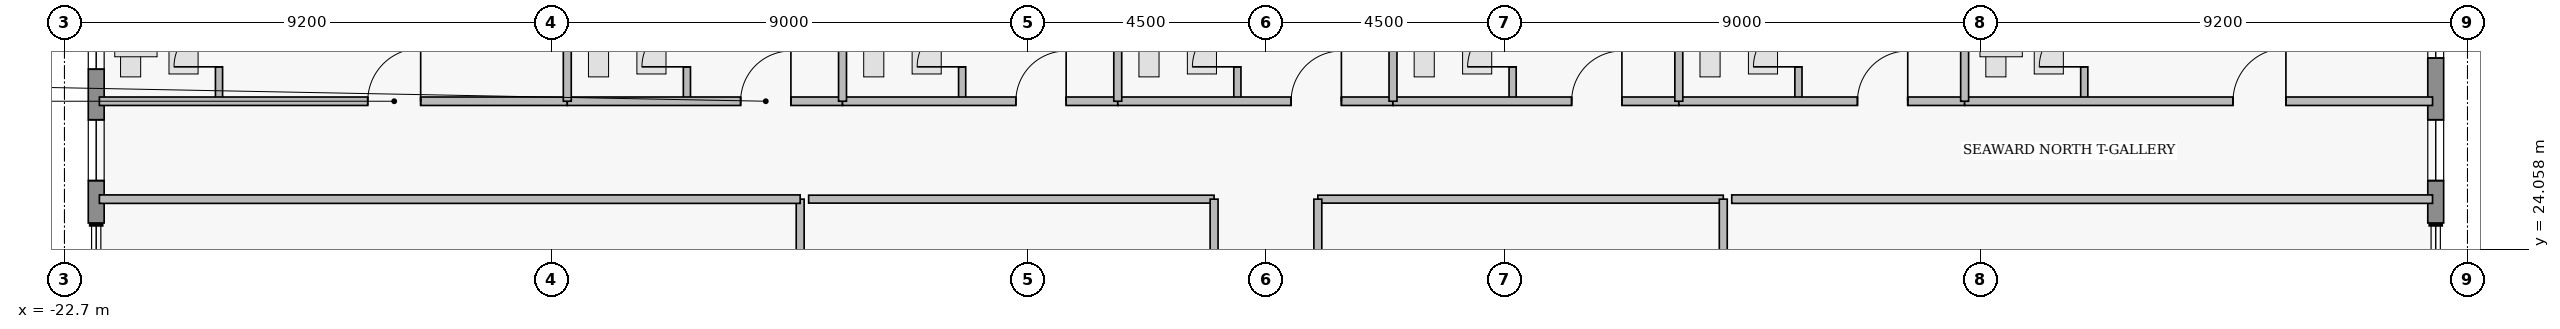
"""IFC4 building model, lengths in metres.
Left out: names, types, materials, properties, quantities, classifications, styles, units other than length and angle.
Written with IfcOpenShell. Run it as: python <this file> out.ifc"""

import sys

from ifc_helpers import new_model, si_unit, direction, frame, frame_2d, origin, place, context, subcontext, project, spatial, rectangle, extrude, element, fill, save


model = new_model("IFC4")
c1 = context("Model", 3, precision=1e-05, world=origin(), true_north=direction((0.0, 1.0)))
c2 = subcontext(c1, "Body", "Model", "MODEL_VIEW")
j1 = project(units=[si_unit("LENGTHUNIT", "METRE"), si_unit("PLANEANGLEUNIT", "RADIAN")], contexts=[c1])
p1 = place(None, origin())
s1 = spatial("IfcSite", under=j1, at=p1, CompositionType="ELEMENT")
p2 = place(p1, origin())
s2 = spatial("IfcBuilding", under=s1, at=p2, CompositionType="ELEMENT")
p3 = place(p2, frame((0.0, 0.0, 199.9)))
s3 = spatial("IfcBuildingStorey", under=s2, at=p3, CompositionType="ELEMENT", Elevation=199.9)
p4 = place(p3, frame((-22.1, 24.55, 0.0), z_axis=(0.0, 0.0, 1.0), x_axis=(0.0, 1.0, 0.0)))
e1 = element("IfcWall", 1, at=p4, inside=s3, PredefinedType="STANDARD", context=c2, shape_type="SweptSolid", body=[
    extrude(rectangle(XDim=5.65, YDim=0.3, at=frame_2d((2.825, 0.0))), origin(), (0.0, 0.0, 1.0), 3.53),
])
p5 = place(p4, frame((0.8, 0.0, 0.95)))
e2 = element("IfcOpeningElement", 2, at=p5, cuts=e1, PredefinedType="OPENING", context=c2, shape_type="SweptSolid", body=[
    extrude(rectangle(XDim=1.15, YDim=1.55, at=frame_2d((0.575, 0.775))), frame((0.0, 0.16, 0.0), z_axis=(0.0, -1.0, 0.0), x_axis=(1.0, 0.0, 0.0)), (0.0, 0.0, 1.0), 0.32),
])
p6 = place(p4, frame((2.905, 0.0, 0.95)))
e3 = element("IfcOpeningElement", 3, at=p6, cuts=e1, PredefinedType="OPENING", context=c2, shape_type="SweptSolid", body=[
    extrude(rectangle(XDim=1.15, YDim=1.55, at=frame_2d((0.575, 0.775))), frame((0.0, 0.16, 0.0), z_axis=(0.0, -1.0, 0.0), x_axis=(1.0, 0.0, 0.0)), (0.0, 0.0, 1.0), 0.32),
])
p7 = place(p3, frame((22.1, 30.2, 0.0), z_axis=(0.0, 0.0, 1.0), x_axis=(0.0, -1.0, 0.0)))
e4 = element("IfcWall", 4, at=p7, inside=s3, PredefinedType="STANDARD", context=c2, shape_type="SweptSolid", body=[
    extrude(rectangle(XDim=5.65, YDim=0.3, at=frame_2d((2.825, 0.0))), origin(), (0.0, 0.0, 1.0), 3.53),
])
p8 = place(p7, frame((0.935, 0.0, 0.85)))
e5 = element("IfcOpeningElement", 5, at=p8, cuts=e4, PredefinedType="OPENING", context=c2, shape_type="SweptSolid", body=[
    extrude(rectangle(XDim=1.6, YDim=1.8, at=frame_2d((0.8, 0.9))), frame((0.0, 0.16, 0.0), z_axis=(0.0, -1.0, 0.0), x_axis=(1.0, 0.0, 0.0)), (0.0, 0.0, 1.0), 0.32),
])
p9 = place(p7, frame((3.7, 0.0, 0.95)))
e6 = element("IfcOpeningElement", 6, at=p9, cuts=e4, PredefinedType="OPENING", context=c2, shape_type="SweptSolid", body=[
    extrude(rectangle(XDim=1.15, YDim=1.55, at=frame_2d((0.575, 0.775))), frame((0.0, 0.16, 0.0), z_axis=(0.0, -1.0, 0.0), x_axis=(1.0, 0.0, 0.0)), (0.0, 0.0, 1.0), 0.32),
])
p10 = place(p3, frame((-19.78, 26.85, 0.0), z_axis=(0.0, 0.0, 1.0), x_axis=(0.0, 1.0, 0.0)))
e7 = element("IfcWall", 7, at=p10, inside=s3, PredefinedType="PLUMBINGWALL", context=c2, shape_type="SweptSolid", body=[
    extrude(rectangle(XDim=2.36, YDim=0.135, at=frame_2d((1.18, 0.0))), origin(), (0.0, 0.0, 1.0), 3.53),
])
p11 = place(p10, frame((0.65, 0.0, 0.0)))
e8 = element("IfcOpeningElement", 8, at=p11, cuts=e7, PredefinedType="OPENING", context=c2, shape_type="SweptSolid", body=[
    extrude(rectangle(XDim=0.85, YDim=2.1, at=frame_2d((0.425, 1.05))), frame((0.0, 0.077, 0.0), z_axis=(0.0, -1.0, 0.0), x_axis=(1.0, 0.0, 0.0)), (0.0, 0.0, 1.0), 0.155),
])
p12 = place(p3, frame((-22.04, 26.85, 0.0), z_axis=(0.0, 0.0, 1.0), x_axis=(1.0, 0.0, 0.0)))
e9 = element("IfcWall", 9, at=p12, inside=s3, PredefinedType="PARTITIONING", context=c2, shape_type="SweptSolid", body=[
    extrude(rectangle(XDim=8.84, YDim=0.16, at=frame_2d((4.42, 0.0))), origin(), (0.0, 0.0, 1.0), 3.53),
])
p13 = place(p12, frame((5.07, 0.0, 0.0)))
e10 = element("IfcOpeningElement", 10, at=p13, cuts=e9, PredefinedType="OPENING", context=c2, shape_type="SweptSolid", body=[
    extrude(rectangle(XDim=1.0, YDim=2.15, at=frame_2d((0.5, 1.075))), frame((0.0, 0.09, 0.0), z_axis=(0.0, -1.0, 0.0), x_axis=(1.0, 0.0, 0.0)), (0.0, 0.0, 1.0), 0.18),
])
p14 = place(p3, frame((-10.94, 26.85, 0.0), z_axis=(0.0, 0.0, 1.0), x_axis=(0.0, 1.0, 0.0)))
e11 = element("IfcWall", 11, at=p14, inside=s3, PredefinedType="PLUMBINGWALL", context=c2, shape_type="SweptSolid", body=[
    extrude(rectangle(XDim=2.36, YDim=0.135, at=frame_2d((1.18, 0.0))), origin(), (0.0, 0.0, 1.0), 3.53),
])
p15 = place(p14, frame((0.65, 0.0, 0.0)))
e12 = element("IfcOpeningElement", 12, at=p15, cuts=e11, PredefinedType="OPENING", context=c2, shape_type="SweptSolid", body=[
    extrude(rectangle(XDim=0.85, YDim=2.1, at=frame_2d((0.425, 1.05))), frame((0.0, 0.077, 0.0), z_axis=(0.0, -1.0, 0.0), x_axis=(1.0, 0.0, 0.0)), (0.0, 0.0, 1.0), 0.155),
])
p16 = place(p3, frame((-13.2, 26.85, 0.0), z_axis=(0.0, 0.0, 1.0), x_axis=(1.0, 0.0, 0.0)))
e13 = element("IfcWall", 13, at=p16, inside=s3, PredefinedType="PARTITIONING", context=c2, shape_type="SweptSolid", body=[
    extrude(rectangle(XDim=5.2, YDim=0.16, at=frame_2d((2.6, 0.0))), origin(), (0.0, 0.0, 1.0), 3.53),
])
p17 = place(p16, frame((3.275, 0.0, 0.0)))
e14 = element("IfcOpeningElement", 14, at=p17, cuts=e13, PredefinedType="OPENING", context=c2, shape_type="SweptSolid", body=[
    extrude(rectangle(XDim=0.95, YDim=2.15, at=frame_2d((0.475, 1.075))), frame((0.0, 0.09, 0.0), z_axis=(0.0, -1.0, 0.0), x_axis=(1.0, 0.0, 0.0)), (0.0, 0.0, 1.0), 0.18),
])
p18 = place(p3, frame((-5.74, 26.85, 0.0), z_axis=(0.0, 0.0, 1.0), x_axis=(0.0, 1.0, 0.0)))
e15 = element("IfcWall", 15, at=p18, inside=s3, PredefinedType="PLUMBINGWALL", context=c2, shape_type="SweptSolid", body=[
    extrude(rectangle(XDim=2.36, YDim=0.135, at=frame_2d((1.18, 0.0))), origin(), (0.0, 0.0, 1.0), 3.53),
])
p19 = place(p18, frame((0.65, 0.0, 0.0)))
e16 = element("IfcOpeningElement", 16, at=p19, cuts=e15, PredefinedType="OPENING", context=c2, shape_type="SweptSolid", body=[
    extrude(rectangle(XDim=0.85, YDim=2.1, at=frame_2d((0.425, 1.05))), frame((0.0, 0.077, 0.0), z_axis=(0.0, -1.0, 0.0), x_axis=(1.0, 0.0, 0.0)), (0.0, 0.0, 1.0), 0.155),
])
p20 = place(p3, frame((-8.0, 26.85, 0.0), z_axis=(0.0, 0.0, 1.0), x_axis=(1.0, 0.0, 0.0)))
e17 = element("IfcWall", 17, at=p20, inside=s3, PredefinedType="PARTITIONING", context=c2, shape_type="SweptSolid", body=[
    extrude(rectangle(XDim=5.2, YDim=0.16, at=frame_2d((2.6, 0.0))), origin(), (0.0, 0.0, 1.0), 3.53),
])
p21 = place(p20, frame((3.275, 0.0, 0.0)))
e18 = element("IfcOpeningElement", 18, at=p21, cuts=e17, PredefinedType="OPENING", context=c2, shape_type="SweptSolid", body=[
    extrude(rectangle(XDim=0.95, YDim=2.15, at=frame_2d((0.475, 1.075))), frame((0.0, 0.09, 0.0), z_axis=(0.0, -1.0, 0.0), x_axis=(1.0, 0.0, 0.0)), (0.0, 0.0, 1.0), 0.18),
])
p22 = place(p3, frame((-0.54, 26.85, 0.0), z_axis=(0.0, 0.0, 1.0), x_axis=(0.0, 1.0, 0.0)))
e19 = element("IfcWall", 19, at=p22, inside=s3, PredefinedType="PLUMBINGWALL", context=c2, shape_type="SweptSolid", body=[
    extrude(rectangle(XDim=2.36, YDim=0.135, at=frame_2d((1.18, 0.0))), origin(), (0.0, 0.0, 1.0), 3.53),
])
p23 = place(p22, frame((0.65, 0.0, 0.0)))
e20 = element("IfcOpeningElement", 20, at=p23, cuts=e19, PredefinedType="OPENING", context=c2, shape_type="SweptSolid", body=[
    extrude(rectangle(XDim=0.85, YDim=2.1, at=frame_2d((0.425, 1.05))), frame((0.0, 0.077, 0.0), z_axis=(0.0, -1.0, 0.0), x_axis=(1.0, 0.0, 0.0)), (0.0, 0.0, 1.0), 0.155),
])
p24 = place(p3, frame((-2.8, 26.85, 0.0), z_axis=(0.0, 0.0, 1.0), x_axis=(1.0, 0.0, 0.0)))
e21 = element("IfcWall", 21, at=p24, inside=s3, PredefinedType="PARTITIONING", context=c2, shape_type="SweptSolid", body=[
    extrude(rectangle(XDim=5.2, YDim=0.16, at=frame_2d((2.6, 0.0))), origin(), (0.0, 0.0, 1.0), 3.53),
])
p25 = place(p24, frame((3.275, 0.0, 0.0)))
e22 = element("IfcOpeningElement", 22, at=p25, cuts=e21, PredefinedType="OPENING", context=c2, shape_type="SweptSolid", body=[
    extrude(rectangle(XDim=0.95, YDim=2.15, at=frame_2d((0.475, 1.075))), frame((0.0, 0.09, 0.0), z_axis=(0.0, -1.0, 0.0), x_axis=(1.0, 0.0, 0.0)), (0.0, 0.0, 1.0), 0.18),
])
p26 = place(p3, frame((4.66, 26.85, 0.0), z_axis=(0.0, 0.0, 1.0), x_axis=(0.0, 1.0, 0.0)))
e23 = element("IfcWall", 23, at=p26, inside=s3, PredefinedType="PLUMBINGWALL", context=c2, shape_type="SweptSolid", body=[
    extrude(rectangle(XDim=2.36, YDim=0.135, at=frame_2d((1.18, 0.0))), origin(), (0.0, 0.0, 1.0), 2.519),
])
p27 = place(p26, frame((0.65, 0.0, 0.0)))
e24 = element("IfcOpeningElement", 24, at=p27, cuts=e23, PredefinedType="OPENING", context=c2, shape_type="SweptSolid", body=[
    extrude(rectangle(XDim=0.85, YDim=2.1, at=frame_2d((0.425, 1.05))), frame((0.0, 0.077, 0.0), z_axis=(0.0, -1.0, 0.0), x_axis=(1.0, 0.0, 0.0)), (0.0, 0.0, 1.0), 0.155),
])
p28 = place(p3, frame((2.4, 26.85, 0.0), z_axis=(0.0, 0.0, 1.0), x_axis=(1.0, 0.0, 0.0)))
e25 = element("IfcWall", 25, at=p28, inside=s3, PredefinedType="PARTITIONING", context=c2, shape_type="SweptSolid", body=[
    extrude(rectangle(XDim=5.4, YDim=0.16, at=frame_2d((2.7, 0.0))), origin(), (0.0, 0.0, 1.0), 3.53),
])
p29 = place(p28, frame((3.375, 0.0, 0.0)))
e26 = element("IfcOpeningElement", 26, at=p29, cuts=e25, PredefinedType="OPENING", context=c2, shape_type="SweptSolid", body=[
    extrude(rectangle(XDim=0.95, YDim=2.15, at=frame_2d((0.475, 1.075))), frame((0.0, 0.09, 0.0), z_axis=(0.0, -1.0, 0.0), x_axis=(1.0, 0.0, 0.0)), (0.0, 0.0, 1.0), 0.18),
])
p30 = place(p3, frame((10.06, 26.85, 0.0), z_axis=(0.0, 0.0, 1.0), x_axis=(0.0, 1.0, 0.0)))
e27 = element("IfcWall", 27, at=p30, inside=s3, PredefinedType="PLUMBINGWALL", context=c2, shape_type="SweptSolid", body=[
    extrude(rectangle(XDim=2.36, YDim=0.135, at=frame_2d((1.18, 0.0))), origin(), (0.0, 0.0, 1.0), 3.53),
])
p31 = place(p30, frame((0.65, 0.0, 0.0)))
e28 = element("IfcOpeningElement", 28, at=p31, cuts=e27, PredefinedType="OPENING", context=c2, shape_type="SweptSolid", body=[
    extrude(rectangle(XDim=0.85, YDim=2.1, at=frame_2d((0.425, 1.05))), frame((0.0, 0.077, 0.0), z_axis=(0.0, -1.0, 0.0), x_axis=(1.0, 0.0, 0.0)), (0.0, 0.0, 1.0), 0.155),
])
p32 = place(p3, frame((7.8, 26.85, 0.0), z_axis=(0.0, 0.0, 1.0), x_axis=(1.0, 0.0, 0.0)))
e29 = element("IfcWall", 29, at=p32, inside=s3, PredefinedType="PARTITIONING", context=c2, shape_type="SweptSolid", body=[
    extrude(rectangle(XDim=5.4, YDim=0.16, at=frame_2d((2.7, 0.0))), origin(), (0.0, 0.0, 1.0), 3.53),
])
p33 = place(p32, frame((3.375, 0.0, 0.0)))
e30 = element("IfcOpeningElement", 30, at=p33, cuts=e29, PredefinedType="OPENING", context=c2, shape_type="SweptSolid", body=[
    extrude(rectangle(XDim=0.95, YDim=2.15, at=frame_2d((0.475, 1.075))), frame((0.0, 0.09, 0.0), z_axis=(0.0, -1.0, 0.0), x_axis=(1.0, 0.0, 0.0)), (0.0, 0.0, 1.0), 0.18),
])
p34 = place(p3, frame((15.46, 26.85, 0.0), z_axis=(0.0, 0.0, 1.0), x_axis=(0.0, 1.0, 0.0)))
e31 = element("IfcWall", 31, at=p34, inside=s3, PredefinedType="PLUMBINGWALL", context=c2, shape_type="SweptSolid", body=[
    extrude(rectangle(XDim=2.36, YDim=0.135, at=frame_2d((1.18, 0.0))), origin(), (0.0, 0.0, 1.0), 3.53),
])
p35 = place(p34, frame((0.65, 0.0, 0.0)))
e32 = element("IfcOpeningElement", 32, at=p35, cuts=e31, PredefinedType="OPENING", context=c2, shape_type="SweptSolid", body=[
    extrude(rectangle(XDim=0.85, YDim=2.1, at=frame_2d((0.425, 1.05))), frame((0.0, 0.077, 0.0), z_axis=(0.0, -1.0, 0.0), x_axis=(1.0, 0.0, 0.0)), (0.0, 0.0, 1.0), 0.155),
])
p36 = place(p3, frame((13.2, 26.85, 0.0), z_axis=(0.0, 0.0, 1.0), x_axis=(1.0, 0.0, 0.0)))
e33 = element("IfcWall", 33, at=p36, inside=s3, PredefinedType="PARTITIONING", context=c2, shape_type="SweptSolid", body=[
    extrude(rectangle(XDim=8.84, YDim=0.16, at=frame_2d((4.42, 0.0))), origin(), (0.0, 0.0, 1.0), 3.53),
])
p37 = place(p36, frame((5.07, 0.0, 0.0)))
e34 = element("IfcOpeningElement", 34, at=p37, cuts=e33, PredefinedType="OPENING", context=c2, shape_type="SweptSolid", body=[
    extrude(rectangle(XDim=1.0, YDim=2.15, at=frame_2d((0.5, 1.075))), frame((0.0, 0.09, 0.0), z_axis=(0.0, -1.0, 0.0), x_axis=(1.0, 0.0, 0.0)), (0.0, 0.0, 1.0), 0.18),
])
for number, where, z_axis, x_axis in (
    (35, (-13.2, 26.85, 0.0), (0.0, 0.0, 1.0), (0.0, 1.0, 0.0)),
    (36, (-8.0, 26.85, 0.0), (0.0, 0.0, 1.0), (0.0, 1.0, 0.0)),
    (37, (-2.8, 26.85, 0.0), (0.0, 0.0, 1.0), (0.0, 1.0, 0.0)),
    (38, (2.4, 26.85, 0.0), (0.0, 0.0, 1.0), (0.0, 1.0, 0.0)),
    (39, (7.8, 26.85, 0.0), (0.0, 0.0, 1.0), (0.0, 1.0, 0.0)),
    (40, (13.2, 26.85, 0.0), (0.0, 0.0, 1.0), (0.0, 1.0, 0.0)),
):
    element("IfcWall", number, at=place(p3, frame(where, z_axis=z_axis, x_axis=x_axis)), inside=s3, PredefinedType="PARTITIONING", context=c2, shape_type="SweptSolid", body=[
        extrude(rectangle(XDim=6.67, YDim=0.15, at=frame_2d((3.335, 0.0))), origin(), (0.0, 0.0, 1.0), 3.53),
    ])
p38 = place(p3, frame((-8.8, 16.7, 0.0), z_axis=(0.0, 0.0, 1.0), x_axis=(0.0, 1.0, 0.0)))
e41 = element("IfcWall", 41, at=p38, inside=s3, PredefinedType="PARTITIONING", context=c2, shape_type="SweptSolid", body=[
    extrude(rectangle(XDim=8.3, YDim=0.15, at=frame_2d((4.15, 0.0))), origin(), (0.0, 0.0, 1.0), 3.53),
])
p39 = place(p3, frame((-22.04, 25.0, 0.0), z_axis=(0.0, 0.0, 1.0), x_axis=(1.0, 0.0, 0.0)))
e42 = element("IfcWall", 42, at=p39, inside=s3, PredefinedType="PARTITIONING", context=c2, shape_type="SweptSolid", body=[
    extrude(rectangle(XDim=13.24, YDim=0.16, at=frame_2d((6.62, 0.0))), origin(), (0.0, 0.0, 1.0), 3.124),
])
p40 = place(p3, frame((-8.64, 25.0, 0.0), z_axis=(0.0, 0.0, 1.0), x_axis=(1.0, 0.0, 0.0)))
e43 = element("IfcWall", 43, at=p40, inside=s3, PredefinedType="PARTITIONING", context=c2, shape_type="SweptSolid", body=[
    extrude(rectangle(XDim=7.66, YDim=0.15, at=frame_2d((3.83, 0.0))), origin(), (0.0, 0.0, 1.0), 3.124),
])
p41 = place(p3, frame((-0.98, 16.7, 0.0), z_axis=(0.0, 0.0, 1.0), x_axis=(0.0, 1.0, 0.0)))
e44 = element("IfcWall", 44, at=p41, inside=s3, PredefinedType="PARTITIONING", context=c2, shape_type="SweptSolid", body=[
    extrude(rectangle(XDim=8.3, YDim=0.15, at=frame_2d((4.15, 0.0))), origin(), (0.0, 0.0, 1.0), 3.53),
])
p42 = place(p3, frame((0.98, 25.0, 0.0), z_axis=(0.0, 0.0, 1.0), x_axis=(1.0, 0.0, 0.0)))
e45 = element("IfcWall", 45, at=p42, inside=s3, PredefinedType="PARTITIONING", context=c2, shape_type="SweptSolid", body=[
    extrude(rectangle(XDim=7.66, YDim=0.15, at=frame_2d((3.83, 0.0))), origin(), (0.0, 0.0, 1.0), 3.124),
])
for number, where, z_axis, x_axis in (
    (46, (0.98, 16.7, 0.0), (0.0, 0.0, 1.0), (0.0, 1.0, 0.0)),
    (47, (8.64, 16.7, 0.0), (0.0, 0.0, 1.0), (0.0, 1.0, 0.0)),
):
    element("IfcWall", number, at=place(p3, frame(where, z_axis=z_axis, x_axis=x_axis)), inside=s3, PredefinedType="PARTITIONING", context=c2, shape_type="SweptSolid", body=[
        extrude(rectangle(XDim=8.3, YDim=0.15, at=frame_2d((4.15, 0.0))), origin(), (0.0, 0.0, 1.0), 3.53),
    ])
p43 = place(p3, frame((8.8, 25.0, 0.0), z_axis=(0.0, 0.0, 1.0), x_axis=(1.0, 0.0, 0.0)))
e48 = element("IfcWall", 48, at=p43, inside=s3, PredefinedType="PARTITIONING", context=c2, shape_type="SweptSolid", body=[
    extrude(rectangle(XDim=13.24, YDim=0.16, at=frame_2d((6.62, 0.0))), origin(), (0.0, 0.0, 1.0), 3.124),
])
p44 = place(p5, origin())
e49 = element("IfcWindow", 49, at=p44, inside=s3, PartitioningType="SINGLE_PANEL", PredefinedType="WINDOW", context=c2, shape_type="SweptSolid", body=[
    extrude(rectangle(XDim=1.15, YDim=1.55, at=frame_2d((0.575, 0.775))), frame((0.0, 0.03, 0.0), z_axis=(0.0, -1.0, 0.0), x_axis=(1.0, 0.0, 0.0)), (0.0, 0.0, 1.0), 0.06),
])
fill(e2, e49)
p45 = place(p6, origin())
e50 = element("IfcWindow", 50, at=p45, inside=s3, PartitioningType="SINGLE_PANEL", PredefinedType="WINDOW", context=c2, shape_type="SweptSolid", body=[
    extrude(rectangle(XDim=1.15, YDim=1.55, at=frame_2d((0.575, 0.775))), frame((0.0, 0.03, 0.0), z_axis=(0.0, -1.0, 0.0), x_axis=(1.0, 0.0, 0.0)), (0.0, 0.0, 1.0), 0.06),
])
fill(e3, e50)
p46 = place(p8, origin())
e51 = element("IfcWindow", 51, at=p46, inside=s3, PartitioningType="SINGLE_PANEL", PredefinedType="WINDOW", context=c2, shape_type="SweptSolid", body=[
    extrude(rectangle(XDim=1.6, YDim=1.8, at=frame_2d((0.8, 0.9))), frame((0.0, 0.03, 0.0), z_axis=(0.0, -1.0, 0.0), x_axis=(1.0, 0.0, 0.0)), (0.0, 0.0, 1.0), 0.06),
])
fill(e5, e51)
p47 = place(p9, origin())
e52 = element("IfcWindow", 52, at=p47, inside=s3, PartitioningType="SINGLE_PANEL", PredefinedType="WINDOW", context=c2, shape_type="SweptSolid", body=[
    extrude(rectangle(XDim=1.15, YDim=1.55, at=frame_2d((0.575, 0.775))), frame((0.0, 0.03, 0.0), z_axis=(0.0, -1.0, 0.0), x_axis=(1.0, 0.0, 0.0)), (0.0, 0.0, 1.0), 0.06),
])
fill(e6, e52)
p48 = place(p11, origin())
e53 = element("IfcDoor", 53, at=p48, inside=s3, OperationType="SINGLE_SWING_LEFT", PredefinedType="DOOR", context=c2, shape_type="SweptSolid", body=[
    extrude(rectangle(XDim=0.85, YDim=2.1, at=frame_2d((0.425, 1.05))), frame((0.0, 0.025, 0.0), z_axis=(0.0, -1.0, 0.0), x_axis=(1.0, 0.0, 0.0)), (0.0, 0.0, 1.0), 0.05),
])
fill(e8, e53)
p49 = place(p13, origin())
e54 = element("IfcDoor", 54, at=p49, inside=s3, OperationType="SINGLE_SWING_RIGHT", PredefinedType="DOOR", context=c2, shape_type="SweptSolid", body=[
    extrude(rectangle(XDim=1.0, YDim=2.15, at=frame_2d((0.5, 1.075))), frame((0.0, 0.025, 0.0), z_axis=(0.0, -1.0, 0.0), x_axis=(1.0, 0.0, 0.0)), (0.0, 0.0, 1.0), 0.05),
])
fill(e10, e54)
p50 = place(p15, origin())
e55 = element("IfcDoor", 55, at=p50, inside=s3, OperationType="SINGLE_SWING_LEFT", PredefinedType="DOOR", context=c2, shape_type="SweptSolid", body=[
    extrude(rectangle(XDim=0.85, YDim=2.1, at=frame_2d((0.425, 1.05))), frame((0.0, 0.025, 0.0), z_axis=(0.0, -1.0, 0.0), x_axis=(1.0, 0.0, 0.0)), (0.0, 0.0, 1.0), 0.05),
])
fill(e12, e55)
p51 = place(p17, origin())
e56 = element("IfcDoor", 56, at=p51, inside=s3, OperationType="SINGLE_SWING_RIGHT", PredefinedType="DOOR", context=c2, shape_type="SweptSolid", body=[
    extrude(rectangle(XDim=0.95, YDim=2.15, at=frame_2d((0.475, 1.075))), frame((0.0, 0.025, 0.0), z_axis=(0.0, -1.0, 0.0), x_axis=(1.0, 0.0, 0.0)), (0.0, 0.0, 1.0), 0.05),
])
fill(e14, e56)
p52 = place(p19, origin())
e57 = element("IfcDoor", 57, at=p52, inside=s3, OperationType="SINGLE_SWING_LEFT", PredefinedType="DOOR", context=c2, shape_type="SweptSolid", body=[
    extrude(rectangle(XDim=0.85, YDim=2.1, at=frame_2d((0.425, 1.05))), frame((0.0, 0.025, 0.0), z_axis=(0.0, -1.0, 0.0), x_axis=(1.0, 0.0, 0.0)), (0.0, 0.0, 1.0), 0.05),
])
fill(e16, e57)
p53 = place(p21, origin())
e58 = element("IfcDoor", 58, at=p53, inside=s3, OperationType="SINGLE_SWING_RIGHT", PredefinedType="DOOR", context=c2, shape_type="SweptSolid", body=[
    extrude(rectangle(XDim=0.95, YDim=2.15, at=frame_2d((0.475, 1.075))), frame((0.0, 0.025, 0.0), z_axis=(0.0, -1.0, 0.0), x_axis=(1.0, 0.0, 0.0)), (0.0, 0.0, 1.0), 0.05),
])
fill(e18, e58)
p54 = place(p23, origin())
e59 = element("IfcDoor", 59, at=p54, inside=s3, OperationType="SINGLE_SWING_LEFT", PredefinedType="DOOR", context=c2, shape_type="SweptSolid", body=[
    extrude(rectangle(XDim=0.85, YDim=2.1, at=frame_2d((0.425, 1.05))), frame((0.0, 0.025, 0.0), z_axis=(0.0, -1.0, 0.0), x_axis=(1.0, 0.0, 0.0)), (0.0, 0.0, 1.0), 0.05),
])
fill(e20, e59)
p55 = place(p25, origin())
e60 = element("IfcDoor", 60, at=p55, inside=s3, OperationType="SINGLE_SWING_RIGHT", PredefinedType="DOOR", context=c2, shape_type="SweptSolid", body=[
    extrude(rectangle(XDim=0.95, YDim=2.15, at=frame_2d((0.475, 1.075))), frame((0.0, 0.025, 0.0), z_axis=(0.0, -1.0, 0.0), x_axis=(1.0, 0.0, 0.0)), (0.0, 0.0, 1.0), 0.05),
])
fill(e22, e60)
p56 = place(p27, origin())
e61 = element("IfcDoor", 61, at=p56, inside=s3, OperationType="SINGLE_SWING_LEFT", PredefinedType="DOOR", context=c2, shape_type="SweptSolid", body=[
    extrude(rectangle(XDim=0.85, YDim=2.1, at=frame_2d((0.425, 1.05))), frame((0.0, 0.025, 0.0), z_axis=(0.0, -1.0, 0.0), x_axis=(1.0, 0.0, 0.0)), (0.0, 0.0, 1.0), 0.05),
])
fill(e24, e61)
p57 = place(p29, origin())
e62 = element("IfcDoor", 62, at=p57, inside=s3, OperationType="SINGLE_SWING_RIGHT", PredefinedType="DOOR", context=c2, shape_type="SweptSolid", body=[
    extrude(rectangle(XDim=0.95, YDim=2.15, at=frame_2d((0.475, 1.075))), frame((0.0, 0.025, 0.0), z_axis=(0.0, -1.0, 0.0), x_axis=(1.0, 0.0, 0.0)), (0.0, 0.0, 1.0), 0.05),
])
fill(e26, e62)
p58 = place(p31, origin())
e63 = element("IfcDoor", 63, at=p58, inside=s3, OperationType="SINGLE_SWING_LEFT", PredefinedType="DOOR", context=c2, shape_type="SweptSolid", body=[
    extrude(rectangle(XDim=0.85, YDim=2.1, at=frame_2d((0.425, 1.05))), frame((0.0, 0.025, 0.0), z_axis=(0.0, -1.0, 0.0), x_axis=(1.0, 0.0, 0.0)), (0.0, 0.0, 1.0), 0.05),
])
fill(e28, e63)
p59 = place(p33, origin())
e64 = element("IfcDoor", 64, at=p59, inside=s3, OperationType="SINGLE_SWING_RIGHT", PredefinedType="DOOR", context=c2, shape_type="SweptSolid", body=[
    extrude(rectangle(XDim=0.95, YDim=2.15, at=frame_2d((0.475, 1.075))), frame((0.0, 0.025, 0.0), z_axis=(0.0, -1.0, 0.0), x_axis=(1.0, 0.0, 0.0)), (0.0, 0.0, 1.0), 0.05),
])
fill(e30, e64)
p60 = place(p35, origin())
e65 = element("IfcDoor", 65, at=p60, inside=s3, OperationType="SINGLE_SWING_LEFT", PredefinedType="DOOR", context=c2, shape_type="SweptSolid", body=[
    extrude(rectangle(XDim=0.85, YDim=2.1, at=frame_2d((0.425, 1.05))), frame((0.0, 0.025, 0.0), z_axis=(0.0, -1.0, 0.0), x_axis=(1.0, 0.0, 0.0)), (0.0, 0.0, 1.0), 0.05),
])
fill(e32, e65)
p61 = place(p37, origin())
e66 = element("IfcDoor", 66, at=p61, inside=s3, OperationType="SINGLE_SWING_RIGHT", PredefinedType="DOOR", context=c2, shape_type="SweptSolid", body=[
    extrude(rectangle(XDim=1.0, YDim=2.15, at=frame_2d((0.5, 1.075))), frame((0.0, 0.025, 0.0), z_axis=(0.0, -1.0, 0.0), x_axis=(1.0, 0.0, 0.0)), (0.0, 0.0, 1.0), 0.05),
])
fill(e34, e66)
save(model, sys.argv[1])
